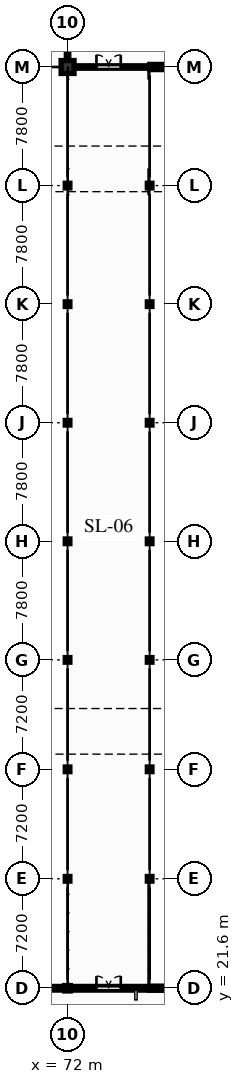
"""IFC4 building model, lengths in metres.
Left out: names, types, materials, properties, quantities, classifications, styles, units other than length and angle.
Written with IfcOpenShell. Run it as: python <this file> out.ifc"""

import sys

from ifc_helpers import new_model, si_unit, direction, frame, frame_2d, origin, origin_2d, place, context, subcontext, project, spatial, rectangle, hollow_rectangle, i_section, extrude, element, fill, save


model = new_model("IFC4")
c1 = context("Model", 3, precision=1e-05, world=origin(), true_north=direction((0.0, 1.0)))
c2 = subcontext(c1, "Body", "Model", "MODEL_VIEW")
j1 = project(units=[si_unit("LENGTHUNIT", "METRE"), si_unit("PLANEANGLEUNIT", "RADIAN")], contexts=[c1])
p1 = place(None, origin())
s1 = spatial("IfcSite", under=j1, at=p1, CompositionType="ELEMENT")
p2 = place(p1, origin())
s2 = spatial("IfcBuilding", under=s1, at=p2, CompositionType="ELEMENT")
p3 = place(p2, frame((0.0, 0.0, 5.1)))
s3 = spatial("IfcBuildingStorey", under=s2, at=p3, CompositionType="ELEMENT", Elevation=5.1)
p4 = place(p3, frame((72.0, 21.6, 0.0), z_axis=(0.0, 0.0, 1.0), x_axis=(1.0, 0.0, 0.0)))
e1 = element("IfcColumn", 1, at=p4, inside=s3, PredefinedType="COLUMN", context=c2, shape_type="SweptSolid", body=[
    extrude(i_section(OverallWidth=0.368, OverallDepth=0.356, WebThickness=0.011, FlangeThickness=0.018, at=origin_2d()), origin(), (0.0, 0.0, 1.0), 3.84),
])
for number, where, z_axis, x_axis in (
    (2, (72.0, 28.8, 0.0), (0.0, 0.0, 1.0), (1.0, 0.0, 0.0)),
    (3, (72.0, 36.0, 0.0), (0.0, 0.0, 1.0), (1.0, 0.0, 0.0)),
    (4, (72.0, 43.2, 0.0), (0.0, 0.0, 1.0), (1.0, 0.0, 0.0)),
    (5, (72.0, 51.0, 0.0), (0.0, 0.0, 1.0), (1.0, 0.0, 0.0)),
    (6, (72.0, 58.8, 0.0), (0.0, 0.0, 1.0), (1.0, 0.0, 0.0)),
    (7, (72.0, 66.6, 0.0), (0.0, 0.0, 1.0), (1.0, 0.0, 0.0)),
    (8, (72.0, 74.4, 0.0), (0.0, 0.0, 1.0), (1.0, 0.0, 0.0)),
):
    element("IfcColumn", number, at=place(p3, frame(where, z_axis=z_axis, x_axis=x_axis)), inside=s3, PredefinedType="COLUMN", context=c2, shape_type="SweptSolid", body=[
        extrude(hollow_rectangle(XDim=0.305, YDim=0.305, WallThickness=0.015, at=origin_2d()), origin(), (0.0, 0.0, 1.0), 3.84),
    ])
p5 = place(p3, frame((72.0, 82.2, 0.0), z_axis=(0.0, 0.0, 1.0), x_axis=(1.0, 0.0, 0.0)))
e9 = element("IfcColumn", 9, at=p5, inside=s3, PredefinedType="COLUMN", context=c2, shape_type="SweptSolid", body=[
    extrude(rectangle(XDim=0.85, YDim=0.85, at=origin_2d()), origin(), (0.0, 0.0, 1.0), 3.84),
])
for number, where, z_axis, x_axis in (
    (10, (77.4, 28.8, 0.0), (0.0, 0.0, 1.0), (1.0, 0.0, 0.0)),
    (11, (77.4, 36.0, 0.0), (0.0, 0.0, 1.0), (1.0, 0.0, 0.0)),
    (12, (77.4, 43.2, 0.0), (0.0, 0.0, 1.0), (1.0, 0.0, 0.0)),
    (13, (77.4, 51.0, 0.0), (0.0, 0.0, 1.0), (1.0, 0.0, 0.0)),
    (14, (77.4, 58.8, 0.0), (0.0, 0.0, 1.0), (1.0, 0.0, 0.0)),
    (15, (77.4, 66.6, 0.0), (0.0, 0.0, 1.0), (1.0, 0.0, 0.0)),
    (16, (77.4, 74.4, 0.0), (0.0, 0.0, 1.0), (1.0, 0.0, 0.0)),
):
    element("IfcColumn", number, at=place(p3, frame(where, z_axis=z_axis, x_axis=x_axis)), inside=s3, PredefinedType="COLUMN", context=c2, shape_type="SweptSolid", body=[
        extrude(hollow_rectangle(XDim=0.305, YDim=0.305, WallThickness=0.015, at=origin_2d()), origin(), (0.0, 0.0, 1.0), 3.84),
    ])
p6 = place(p3, frame((77.4, 82.2, 0.0), z_axis=(0.0, 0.0, 1.0), x_axis=(1.0, 0.0, 0.0)))
e17 = element("IfcWall", 17, at=p6, inside=s3, PredefinedType="SOLIDWALL", context=c2, shape_type="SweptSolid", body=[
    extrude(rectangle(XDim=3.6, YDim=0.34, at=frame_2d((1.8, 0.0))), origin(), (0.0, 0.0, 1.0), 3.55),
])
p7 = place(p3, frame((63.0, 21.6, 3.55), z_axis=(0.0, 0.0, 1.0), x_axis=(1.0, 0.0, 0.0)))
e18 = element("IfcWall", 18, at=p7, inside=s3, PredefinedType="SOLIDWALL", context=c2, shape_type="SweptSolid", body=[
    extrude(rectangle(XDim=45.0, YDim=0.24, at=frame_2d((22.5, 0.0))), origin(), (0.0, 0.0, 1.0), 2.781),
])
p8 = place(p7, frame((3.0, 0.0, 0.45)))
e19 = element("IfcOpeningElement", 19, at=p8, cuts=e18, PredefinedType="OPENING", context=c2, shape_type="SweptSolid", body=[
    extrude(rectangle(XDim=2.4, YDim=1.1, at=frame_2d((1.2, 0.55))), frame((0.0, 0.13, 0.0), z_axis=(0.0, -1.0, 0.0), x_axis=(1.0, 0.0, 0.0)), (0.0, 0.0, 1.0), 0.26),
])
p9 = place(p7, frame((11.2, 0.0, 0.45)))
e20 = element("IfcOpeningElement", 20, at=p9, cuts=e18, PredefinedType="OPENING", context=c2, shape_type="SweptSolid", body=[
    extrude(rectangle(XDim=2.4, YDim=1.1, at=frame_2d((1.2, 0.55))), frame((0.0, 0.13, 0.0), z_axis=(0.0, -1.0, 0.0), x_axis=(1.0, 0.0, 0.0)), (0.0, 0.0, 1.0), 0.26),
])
p10 = place(p7, frame((23.65, 0.0, 0.45)))
e21 = element("IfcOpeningElement", 21, at=p10, cuts=e18, PredefinedType="OPENING", context=c2, shape_type="SweptSolid", body=[
    extrude(rectangle(XDim=2.4, YDim=1.1, at=frame_2d((1.2, 0.55))), frame((0.0, 0.13, 0.0), z_axis=(0.0, -1.0, 0.0), x_axis=(1.0, 0.0, 0.0)), (0.0, 0.0, 1.0), 0.26),
])
p11 = place(p7, frame((37.35, 0.0, 0.45)))
e22 = element("IfcOpeningElement", 22, at=p11, cuts=e18, PredefinedType="OPENING", context=c2, shape_type="SweptSolid", body=[
    extrude(rectangle(XDim=2.4, YDim=1.1, at=frame_2d((1.2, 0.55))), frame((0.0, 0.13, 0.0), z_axis=(0.0, -1.0, 0.0), x_axis=(1.0, 0.0, 0.0)), (0.0, 0.0, 1.0), 0.26),
])
p12 = place(p3, frame((77.4, 21.6, 0.0), z_axis=(0.0, 0.0, 1.0), x_axis=(1.0, 0.0, 0.0)))
e23 = element("IfcWall", 23, at=p12, inside=s3, PredefinedType="SOLIDWALL", context=c2, shape_type="SweptSolid", body=[
    extrude(rectangle(XDim=3.6, YDim=0.26, at=frame_2d((1.8, 0.0))), origin(), (0.0, 0.0, 1.0), 2.974),
])
p13 = place(p3, frame((72.0, 82.2, 0.0), z_axis=(0.0, 0.0, 1.0), x_axis=(0.0, 1.0, 0.0)))
e24 = element("IfcWall", 24, at=p13, inside=s3, PredefinedType="PARTITIONING", context=c2, shape_type="SweptSolid", body=[
    extrude(rectangle(XDim=13.4, YDim=0.16, at=frame_2d((6.7, 0.0))), origin(), (0.0, 0.0, 1.0), 2.855),
])
p14 = place(p3, frame((72.0, 82.2, 0.0), z_axis=(0.0, 0.0, 1.0), x_axis=(1.0, 0.0, 0.0)))
e25 = element("IfcWall", 25, at=p14, inside=s3, PredefinedType="PARTITIONING", context=c2, shape_type="SweptSolid", body=[
    extrude(rectangle(XDim=5.4, YDim=0.16, at=frame_2d((2.7, 0.0))), origin(), (0.0, 0.0, 1.0), 2.855),
])
p15 = place(p14, frame((1.9, 0.0, 0.0)))
e26 = element("IfcOpeningElement", 26, at=p15, cuts=e25, PredefinedType="OPENING", context=c2, shape_type="SweptSolid", body=[
    extrude(rectangle(XDim=1.6, YDim=2.2, at=frame_2d((0.8, 1.1))), frame((0.0, 0.09, 0.0), z_axis=(0.0, -1.0, 0.0), x_axis=(1.0, 0.0, 0.0)), (0.0, 0.0, 1.0), 0.18),
])
p16 = place(p3, frame((72.0, 21.6, 0.0), z_axis=(0.0, 0.0, 1.0), x_axis=(1.0, 0.0, 0.0)))
e27 = element("IfcWall", 27, at=p16, inside=s3, PredefinedType="PARTITIONING", context=c2, shape_type="SweptSolid", body=[
    extrude(rectangle(XDim=5.4, YDim=0.16, at=frame_2d((2.7, 0.0))), origin(), (0.0, 0.0, 1.0), 2.974),
])
p17 = place(p16, frame((1.9, 0.0, 0.0)))
e28 = element("IfcOpeningElement", 28, at=p17, cuts=e27, PredefinedType="OPENING", context=c2, shape_type="SweptSolid", body=[
    extrude(rectangle(XDim=1.6, YDim=2.2, at=frame_2d((0.8, 1.1))), frame((0.0, 0.09, 0.0), z_axis=(0.0, -1.0, 0.0), x_axis=(1.0, 0.0, 0.0)), (0.0, 0.0, 1.0), 0.18),
])
p18 = place(p9, origin())
e29 = element("IfcWindow", 29, at=p18, inside=s3, PartitioningType="SINGLE_PANEL", PredefinedType="WINDOW", context=c2, shape_type="SweptSolid", body=[
    extrude(rectangle(XDim=2.4, YDim=1.1, at=frame_2d((1.2, 0.55))), frame((0.0, 0.03, 0.0), z_axis=(0.0, -1.0, 0.0), x_axis=(1.0, 0.0, 0.0)), (0.0, 0.0, 1.0), 0.06),
])
fill(e20, e29)
p19 = place(p15, origin())
e30 = element("IfcDoor", 30, at=p19, inside=s3, OperationType="DOUBLE_DOOR_SINGLE_SWING", PredefinedType="DOOR", context=c2, shape_type="SweptSolid", body=[
    extrude(rectangle(XDim=1.6, YDim=2.2, at=frame_2d((0.8, 1.1))), frame((0.0, 0.025, 0.0), z_axis=(0.0, -1.0, 0.0), x_axis=(1.0, 0.0, 0.0)), (0.0, 0.0, 1.0), 0.05),
])
fill(e26, e30)
p20 = place(p17, origin())
e31 = element("IfcDoor", 31, at=p20, inside=s3, OperationType="DOUBLE_DOOR_SINGLE_SWING", PredefinedType="DOOR", context=c2, shape_type="SweptSolid", body=[
    extrude(rectangle(XDim=1.6, YDim=2.2, at=frame_2d((0.8, 1.1))), frame((0.0, 0.025, 0.0), z_axis=(0.0, -1.0, 0.0), x_axis=(1.0, 0.0, 0.0)), (0.0, 0.0, 1.0), 0.05),
])
fill(e28, e31)
save(model, sys.argv[1])
